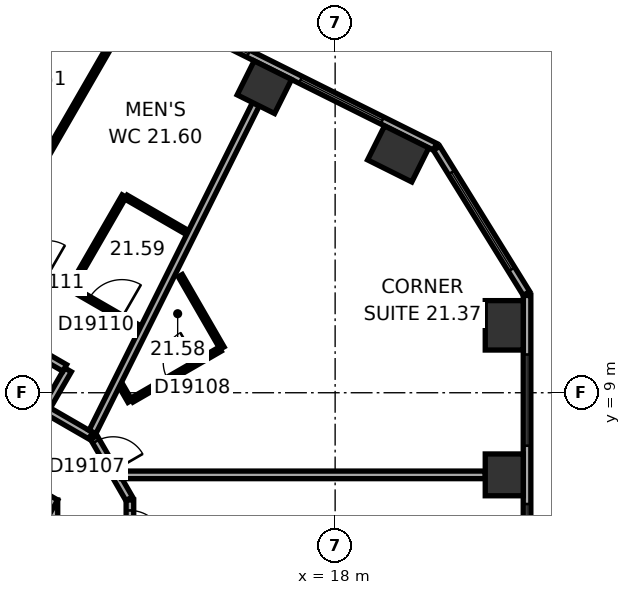
"""IFC4 building model, lengths in metres.
Left out: names, types, materials, properties, quantities, classifications, styles, units other than length and angle.
Written with IfcOpenShell. Run it as: python <this file> out.ifc"""

import sys

from ifc_helpers import new_model, si_unit, direction, frame, frame_2d, origin, origin_2d, place, context, subcontext, project, spatial, rectangle, extrude, element, fill, save


model = new_model("IFC4")
c1 = context("Model", 3, precision=1e-05, world=origin(), true_north=direction((0.0, 1.0)))
c2 = subcontext(c1, "Body", "Model", "MODEL_VIEW")
j1 = project(units=[si_unit("LENGTHUNIT", "METRE"), si_unit("PLANEANGLEUNIT", "RADIAN")], contexts=[c1])
p1 = place(None, origin())
s1 = spatial("IfcSite", under=j1, at=p1, CompositionType="ELEMENT")
p2 = place(p1, origin())
s2 = spatial("IfcBuilding", under=s1, at=p2, CompositionType="ELEMENT")
p3 = place(p2, frame((0.0, 0.0, 93.5)))
s3 = spatial("IfcBuildingStorey", under=s2, at=p3, CompositionType="ELEMENT", Elevation=93.5)
p4 = place(p3, frame((22.45, 6.839, 0.0), z_axis=(0.0, 0.0, 1.0), x_axis=(0.0, 1.0, 0.0)))
e1 = element("IfcColumn", 1, at=p4, inside=s3, PredefinedType="COLUMN", context=c2, shape_type="SweptSolid", body=[
    extrude(rectangle(XDim=1.1, YDim=1.0, at=origin_2d()), origin(), (0.0, 0.0, 1.0), 3.3),
])
for number, where, z_axis, x_axis in (
    (2, (22.45, 10.774, 0.0), (0.0, 0.0, 1.0), (0.0, 1.0, 0.0)),
    (3, (19.659, 15.284, 0.0), (0.0, 0.0, 1.0), (-0.895, 0.446, 0.0)),
):
    element("IfcColumn", number, at=place(p3, frame(where, z_axis=z_axis, x_axis=x_axis)), inside=s3, PredefinedType="COLUMN", context=c2, shape_type="SweptSolid", body=[
        extrude(rectangle(XDim=1.3, YDim=1.0, at=origin_2d()), origin(), (0.0, 0.0, 1.0), 3.3),
    ])
p5 = place(p3, frame((16.138, 17.04, 0.0), z_axis=(0.0, 0.0, 1.0), x_axis=(-0.894934361602, 0.44619781311, 0.0)))
e4 = element("IfcColumn", 4, at=p5, inside=s3, PredefinedType="COLUMN", context=c2, shape_type="SweptSolid", body=[
    extrude(rectangle(XDim=1.1, YDim=1.0, at=origin_2d()), origin(), (0.0, 0.0, 1.0), 3.3),
])
p6 = place(p3, frame((10.1, -6.177, 0.0), z_axis=(0.0, 0.0, 1.0), x_axis=(0.0, 1.0, 0.0)))
e5 = element("IfcWall", 5, at=p6, inside=s3, PredefinedType="SHEAR", context=c2, shape_type="SweptSolid", body=[
    extrude(rectangle(XDim=12.355, YDim=1.2, at=frame_2d((6.177, 0.0))), origin(), (0.0, 0.0, 1.0), 3.3),
])
p7 = place(p6, frame((6.378, 0.0, 0.0)))
e6 = element("IfcOpeningElement", 6, at=p7, cuts=e5, PredefinedType="OPENING", context=c2, shape_type="SweptSolid", body=[
    extrude(rectangle(XDim=1.5, YDim=2.1, at=frame_2d((0.75, 1.05))), frame((0.0, 0.61, 0.0), z_axis=(0.0, -1.0, 0.0), x_axis=(1.0, 0.0, 0.0)), (0.0, 0.0, 1.0), 1.22),
])
p8 = place(p6, frame((1.828, 0.0, 0.0)))
e7 = element("IfcOpeningElement", 7, at=p8, cuts=e5, PredefinedType="OPENING", context=c2, shape_type="SweptSolid", body=[
    extrude(rectangle(XDim=1.1, YDim=2.1, at=frame_2d((0.55, 1.05))), frame((0.0, 0.61, 0.0), z_axis=(0.0, -1.0, 0.0), x_axis=(1.0, 0.0, 0.0)), (0.0, 0.0, 1.0), 1.22),
])
p9 = place(p6, frame((4.427, 0.0, 0.0)))
e8 = element("IfcOpeningElement", 8, at=p9, cuts=e5, PredefinedType="OPENING", context=c2, shape_type="SweptSolid", body=[
    extrude(rectangle(XDim=1.1, YDim=2.1, at=frame_2d((0.55, 1.05))), frame((0.0, 0.61, 0.0), z_axis=(0.0, -1.0, 0.0), x_axis=(1.0, 0.0, 0.0)), (0.0, 0.0, 1.0), 1.22),
])
p10 = place(p3, frame((10.4, 5.658, 0.0), z_axis=(0.0, 0.0, 1.0), x_axis=(-0.866021384402, 0.500006961711, 0.0)))
e9 = element("IfcWall", 9, at=p10, inside=s3, PredefinedType="SHEAR", context=c2, shape_type="SweptSolid", body=[
    extrude(rectangle(XDim=12.355, YDim=1.2, at=frame_2d((6.178, 0.0))), origin(), (0.0, 0.0, 1.0), 3.3),
])
p11 = place(p10, frame((2.728, 0.0, 0.0)))
e10 = element("IfcOpeningElement", 10, at=p11, cuts=e9, PredefinedType="OPENING", context=c2, shape_type="SweptSolid", body=[
    extrude(rectangle(XDim=1.1, YDim=2.1, at=frame_2d((0.55, 1.05))), frame((0.0, 0.61, 0.0), z_axis=(0.0, -1.0, 0.0), x_axis=(1.0, 0.0, 0.0)), (0.0, 0.0, 1.0), 1.22),
])
p12 = place(p10, frame((5.328, 0.0, 0.0)))
e11 = element("IfcOpeningElement", 11, at=p12, cuts=e9, PredefinedType="OPENING", context=c2, shape_type="SweptSolid", body=[
    extrude(rectangle(XDim=1.1, YDim=2.1, at=frame_2d((0.55, 1.05))), frame((0.0, 0.61, 0.0), z_axis=(0.0, -1.0, 0.0), x_axis=(1.0, 0.0, 0.0)), (0.0, 0.0, 1.0), 1.22),
])
p13 = place(p10, frame((7.928, 0.0, 0.0)))
e12 = element("IfcOpeningElement", 12, at=p13, cuts=e9, PredefinedType="OPENING", context=c2, shape_type="SweptSolid", body=[
    extrude(rectangle(XDim=1.1, YDim=2.1, at=frame_2d((0.55, 1.05))), frame((0.0, 0.61, 0.0), z_axis=(0.0, -1.0, 0.0), x_axis=(1.0, 0.0, 0.0)), (0.0, 0.0, 1.0), 1.22),
])
p14 = place(p3, frame((23.05, -9.687, 0.0), z_axis=(0.0, 0.0, 1.0), x_axis=(0.0, 1.0, 0.0)))
e13 = element("IfcWall", 13, at=p14, inside=s3, PredefinedType="STANDARD", context=c2, shape_type="SweptSolid", body=[
    extrude(rectangle(XDim=21.246, YDim=0.2, at=frame_2d((10.623, 0.0))), origin(), (0.0, 0.0, 1.0), 3.3),
])
p15 = place(p14, frame((1.555, 0.0, 0.8)))
e14 = element("IfcOpeningElement", 14, at=p15, cuts=e13, PredefinedType="OPENING", context=c2, shape_type="SweptSolid", body=[
    extrude(rectangle(XDim=2.4, YDim=1.7, at=frame_2d((1.2, 0.85))), frame((0.0, 0.11, 0.0), z_axis=(0.0, -1.0, 0.0), x_axis=(1.0, 0.0, 0.0)), (0.0, 0.0, 1.0), 0.22),
])
p16 = place(p14, frame((5.489, 0.0, 0.8)))
e15 = element("IfcOpeningElement", 15, at=p16, cuts=e13, PredefinedType="OPENING", context=c2, shape_type="SweptSolid", body=[
    extrude(rectangle(XDim=2.4, YDim=1.7, at=frame_2d((1.2, 0.85))), frame((0.0, 0.11, 0.0), z_axis=(0.0, -1.0, 0.0), x_axis=(1.0, 0.0, 0.0)), (0.0, 0.0, 1.0), 0.22),
])
p17 = place(p14, frame((9.424, 0.0, 0.8)))
e16 = element("IfcOpeningElement", 16, at=p17, cuts=e13, PredefinedType="OPENING", context=c2, shape_type="SweptSolid", body=[
    extrude(rectangle(XDim=2.4, YDim=1.7, at=frame_2d((1.2, 0.85))), frame((0.0, 0.11, 0.0), z_axis=(0.0, -1.0, 0.0), x_axis=(1.0, 0.0, 0.0)), (0.0, 0.0, 1.0), 0.22),
])
p18 = place(p14, frame((13.358, 0.0, 0.8)))
e17 = element("IfcOpeningElement", 17, at=p18, cuts=e13, PredefinedType="OPENING", context=c2, shape_type="SweptSolid", body=[
    extrude(rectangle(XDim=2.4, YDim=1.7, at=frame_2d((1.2, 0.85))), frame((0.0, 0.11, 0.0), z_axis=(0.0, -1.0, 0.0), x_axis=(1.0, 0.0, 0.0)), (0.0, 0.0, 1.0), 0.22),
])
p19 = place(p14, frame((17.293, 0.0, 0.8)))
e18 = element("IfcOpeningElement", 18, at=p19, cuts=e13, PredefinedType="OPENING", context=c2, shape_type="SweptSolid", body=[
    extrude(rectangle(XDim=2.4, YDim=1.7, at=frame_2d((1.2, 0.85))), frame((0.0, 0.11, 0.0), z_axis=(0.0, -1.0, 0.0), x_axis=(1.0, 0.0, 0.0)), (0.0, 0.0, 1.0), 0.22),
])
p20 = place(p3, frame((23.035, 11.612, 0.0), z_axis=(0.0, 0.0, 1.0), x_axis=(-0.526160091227, 0.850385535155, 0.0)))
e19 = element("IfcWall", 19, at=p20, inside=s3, PredefinedType="STANDARD", context=c2, shape_type="SweptSolid", body=[
    extrude(rectangle(XDim=4.494, YDim=0.2, at=frame_2d((2.247, 0.0))), origin(), (0.0, 0.0, 1.0), 3.3),
])
p21 = place(p20, frame((0.747, 0.0, 0.8)))
e20 = element("IfcOpeningElement", 20, at=p21, cuts=e19, PredefinedType="OPENING", context=c2, shape_type="SweptSolid", body=[
    extrude(rectangle(XDim=3.0, YDim=1.7, at=frame_2d((1.5, 0.85))), frame((0.0, 0.11, 0.0), z_axis=(0.0, -1.0, 0.0), x_axis=(1.0, 0.0, 0.0)), (0.0, 0.0, 1.0), 0.22),
])
p22 = place(p3, frame((20.63, 15.47, 0.0), z_axis=(0.0, 0.0, 1.0), x_axis=(-0.894934518609, 0.446197498203, 0.0)))
e21 = element("IfcWall", 21, at=p22, inside=s3, PredefinedType="STANDARD", context=c2, shape_type="SweptSolid", body=[
    extrude(rectangle(XDim=21.246, YDim=0.2, at=frame_2d((10.623, 0.0))), origin(), (0.0, 0.0, 1.0), 3.3),
])
p23 = place(p22, frame((1.553, 0.0, 0.8)))
e22 = element("IfcOpeningElement", 22, at=p23, cuts=e21, PredefinedType="OPENING", context=c2, shape_type="SweptSolid", body=[
    extrude(rectangle(XDim=2.4, YDim=1.7, at=frame_2d((1.2, 0.85))), frame((0.0, 0.11, 0.0), z_axis=(0.0, -1.0, 0.0), x_axis=(1.0, 0.0, 0.0)), (0.0, 0.0, 1.0), 0.22),
])
p24 = place(p22, frame((5.488, 0.0, 0.8)))
e23 = element("IfcOpeningElement", 23, at=p24, cuts=e21, PredefinedType="OPENING", context=c2, shape_type="SweptSolid", body=[
    extrude(rectangle(XDim=2.4, YDim=1.7, at=frame_2d((1.2, 0.85))), frame((0.0, 0.11, 0.0), z_axis=(0.0, -1.0, 0.0), x_axis=(1.0, 0.0, 0.0)), (0.0, 0.0, 1.0), 0.22),
])
p25 = place(p22, frame((9.422, 0.0, 0.8)))
e24 = element("IfcOpeningElement", 24, at=p25, cuts=e21, PredefinedType="OPENING", context=c2, shape_type="SweptSolid", body=[
    extrude(rectangle(XDim=2.4, YDim=1.7, at=frame_2d((1.2, 0.85))), frame((0.0, 0.11, 0.0), z_axis=(0.0, -1.0, 0.0), x_axis=(1.0, 0.0, 0.0)), (0.0, 0.0, 1.0), 0.22),
])
p26 = place(p22, frame((13.357, 0.0, 0.8)))
e25 = element("IfcOpeningElement", 25, at=p26, cuts=e21, PredefinedType="OPENING", context=c2, shape_type="SweptSolid", body=[
    extrude(rectangle(XDim=2.4, YDim=1.7, at=frame_2d((1.2, 0.85))), frame((0.0, 0.11, 0.0), z_axis=(0.0, -1.0, 0.0), x_axis=(1.0, 0.0, 0.0)), (0.0, 0.0, 1.0), 0.22),
])
p27 = place(p22, frame((17.292, 0.0, 0.8)))
e26 = element("IfcOpeningElement", 26, at=p27, cuts=e21, PredefinedType="OPENING", context=c2, shape_type="SweptSolid", body=[
    extrude(rectangle(XDim=2.4, YDim=1.7, at=frame_2d((1.2, 0.85))), frame((0.0, 0.11, 0.0), z_axis=(0.0, -1.0, 0.0), x_axis=(1.0, 0.0, 0.0)), (0.0, 0.0, 1.0), 0.22),
])
p28 = place(p3, frame((10.371, 8.561, 0.0), z_axis=(0.0, 0.0, 1.0), x_axis=(0.499986357472, 0.866033280158, 0.0)))
e27 = element("IfcWall", 27, at=p28, inside=s3, PredefinedType="PARTITIONING", context=c2, shape_type="SweptSolid", body=[
    extrude(rectangle(XDim=1.201, YDim=0.2, at=frame_2d((0.601, 0.0))), origin(), (0.0, 0.0, 1.0), 3.05),
])
p29 = place(p3, frame((10.885, 9.652, 0.0), z_axis=(0.0, 0.0, 1.0), x_axis=(-0.866033868542, 0.499985338323, 0.0)))
e28 = element("IfcWall", 28, at=p29, inside=s3, PredefinedType="PARTITIONING", context=c2, shape_type="SweptSolid", body=[
    extrude(rectangle(XDim=8.602, YDim=0.2, at=frame_2d((4.301, 0.0))), origin(), (0.0, 0.0, 1.0), 3.05),
])
p30 = place(p29, frame((2.739, 0.0, 0.0)))
e29 = element("IfcOpeningElement", 29, at=p30, cuts=e28, PredefinedType="OPENING", context=c2, shape_type="SweptSolid", body=[
    extrude(rectangle(XDim=1.0, YDim=2.1, at=frame_2d((0.5, 1.05))), frame((0.0, 0.11, 0.0), z_axis=(0.0, -1.0, 0.0), x_axis=(1.0, 0.0, 0.0)), (0.0, 0.0, 1.0), 0.22),
])
p31 = place(p3, frame((11.566, 7.871, 0.0), z_axis=(0.0, 0.0, 1.0), x_axis=(-0.866004557827, 0.500036104519, 0.0)))
e30 = element("IfcWall", 30, at=p31, inside=s3, PredefinedType="PARTITIONING", context=c2, shape_type="SweptSolid", body=[
    extrude(rectangle(XDim=1.28, YDim=0.2, at=frame_2d((0.64, 0.0))), origin(), (0.0, 0.0, 1.0), 3.05),
])
p32 = place(p3, frame((12.243, 18.423, 0.0), z_axis=(0.0, 0.0, 1.0), x_axis=(-0.499993523031, -0.866029143232, 0.0)))
e31 = element("IfcWall", 31, at=p32, inside=s3, PredefinedType="PARTITIONING", context=c2, shape_type="SweptSolid", body=[
    extrude(rectangle(XDim=6.315, YDim=0.12, at=frame_2d((3.157, 0.0))), origin(), (0.0, 0.0, 1.0), 2.6),
])
p33 = place(p3, frame((12.448, 14.177, 0.0), z_axis=(0.0, 0.0, 1.0), x_axis=(-0.500048966069, -0.865997131366, 0.0)))
e32 = element("IfcWall", 32, at=p33, inside=s3, PredefinedType="PARTITIONING", context=c2, shape_type="SweptSolid", body=[
    extrude(rectangle(XDim=2.74, YDim=0.12, at=frame_2d((1.37, 0.0))), origin(), (0.0, 0.0, 1.0), 3.05),
])
p34 = place(p3, frame((12.58, 6.212, 0.0), z_axis=(0.0, 0.0, 1.0), x_axis=(-0.500063286585, 0.865988862174, 0.0)))
e33 = element("IfcWall", 33, at=p34, inside=s3, PredefinedType="PARTITIONING", context=c2, shape_type="SweptSolid", body=[
    extrude(rectangle(XDim=1.86, YDim=0.2, at=frame_2d((0.93, 0.0))), origin(), (0.0, 0.0, 1.0), 3.05),
])
p35 = place(p34, frame((0.842, 0.0, 0.0)))
e34 = element("IfcOpeningElement", 34, at=p35, cuts=e33, PredefinedType="OPENING", context=c2, shape_type="SweptSolid", body=[
    extrude(rectangle(XDim=0.9, YDim=2.1, at=frame_2d((0.45, 1.05))), frame((0.0, 0.11, 0.0), z_axis=(0.0, -1.0, 0.0), x_axis=(1.0, 0.0, 0.0)), (0.0, 0.0, 1.0), 0.22),
])
p36 = place(p3, frame((12.6, 3.004, 0.0), z_axis=(0.0, 0.0, 1.0), x_axis=(0.0, 1.0, 0.0)))
e35 = element("IfcWall", 35, at=p36, inside=s3, PredefinedType="PARTITIONING", context=c2, shape_type="SweptSolid", body=[
    extrude(rectangle(XDim=3.173, YDim=0.2, at=frame_2d((1.586, 0.0))), origin(), (0.0, 0.0, 1.0), 3.05),
])
p37 = place(p36, frame((1.998, 0.0, 0.0)))
e36 = element("IfcOpeningElement", 36, at=p37, cuts=e35, PredefinedType="OPENING", context=c2, shape_type="SweptSolid", body=[
    extrude(rectangle(XDim=0.9, YDim=2.1, at=frame_2d((0.45, 1.05))), frame((0.0, 0.11, 0.0), z_axis=(0.0, -1.0, 0.0), x_axis=(1.0, 0.0, 0.0)), (0.0, 0.0, 1.0), 0.22),
])
p38 = place(p3, frame((12.601, 8.776, 0.0), z_axis=(0.0, 0.0, 1.0), x_axis=(-0.500166486798, 0.865929261247, 0.0)))
e37 = element("IfcWall", 37, at=p38, inside=s3, PredefinedType="PARTITIONING", context=c2, shape_type="SweptSolid", body=[
    extrude(rectangle(XDim=0.476, YDim=0.12, at=frame_2d((0.238, 0.0))), origin(), (0.0, 0.0, 1.0), 3.05),
])
p39 = place(p3, frame((12.866, 10.702, 0.0), z_axis=(0.0, 0.0, 1.0), x_axis=(-0.866023151433, 0.500003901167, 0.0)))
e38 = element("IfcWall", 38, at=p39, inside=s3, PredefinedType="PARTITIONING", context=c2, shape_type="SweptSolid", body=[
    extrude(rectangle(XDim=7.684, YDim=0.12, at=frame_2d((3.842, 0.0))), origin(), (0.0, 0.0, 1.0), 3.05),
])
p40 = place(p39, frame((0.55, 0.0, 0.0)))
e39 = element("IfcOpeningElement", 39, at=p40, cuts=e38, PredefinedType="OPENING", context=c2, shape_type="SweptSolid", body=[
    extrude(rectangle(XDim=1.0, YDim=2.1, at=frame_2d((0.5, 1.05))), frame((0.0, 0.07, 0.0), z_axis=(0.0, -1.0, 0.0), x_axis=(1.0, 0.0, 0.0)), (0.0, 0.0, 1.0), 0.14),
])
p41 = place(p39, frame((2.8, 0.0, 0.0)))
e40 = element("IfcOpeningElement", 40, at=p41, cuts=e38, PredefinedType="OPENING", context=c2, shape_type="SweptSolid", body=[
    extrude(rectangle(XDim=0.9, YDim=2.1, at=frame_2d((0.45, 1.05))), frame((0.0, 0.07, 0.0), z_axis=(0.0, -1.0, 0.0), x_axis=(1.0, 0.0, 0.0)), (0.0, 0.0, 1.0), 0.14),
])
p42 = place(p39, frame((5.592, 0.0, 0.0)))
e41 = element("IfcOpeningElement", 41, at=p42, cuts=e38, PredefinedType="OPENING", context=c2, shape_type="SweptSolid", body=[
    extrude(rectangle(XDim=0.9, YDim=2.1, at=frame_2d((0.45, 1.05))), frame((0.0, 0.07, 0.0), z_axis=(0.0, -1.0, 0.0), x_axis=(1.0, 0.0, 0.0)), (0.0, 0.0, 1.0), 0.14),
])
p43 = place(p3, frame((13.926, 12.081, 0.0), z_axis=(0.0, 0.0, 1.0), x_axis=(0.499994660107, -0.866028486751, 0.0)))
e42 = element("IfcWall", 42, at=p43, inside=s3, PredefinedType="PARTITIONING", context=c2, shape_type="SweptSolid", body=[
    extrude(rectangle(XDim=2.2, YDim=0.12, at=frame_2d((1.1, 0.0))), origin(), (0.0, 0.0, 1.0), 3.05),
])
p44 = place(p3, frame((14.118, 13.212, 0.0), z_axis=(0.0, 0.0, 1.0), x_axis=(-0.866039825209, 0.499975020527, 0.0)))
e43 = element("IfcWall", 43, at=p44, inside=s3, PredefinedType="PARTITIONING", context=c2, shape_type="SweptSolid", body=[
    extrude(rectangle(XDim=1.869, YDim=0.12, at=frame_2d((0.934, 0.0))), origin(), (0.0, 0.0, 1.0), 3.05),
])
p45 = place(p3, frame((14.974, 10.146, 0.0), z_axis=(0.0, 0.0, 1.0), x_axis=(-0.86599746015, -0.500048396672, 0.0)))
e44 = element("IfcWall", 44, at=p45, inside=s3, PredefinedType="PARTITIONING", context=c2, shape_type="SweptSolid", body=[
    extrude(rectangle(XDim=2.68, YDim=0.12, at=frame_2d((1.34, 0.0))), origin(), (0.0, 0.0, 1.0), 3.05),
])
p46 = place(p45, frame((0.69, 0.0, 0.0)))
e45 = element("IfcOpeningElement", 45, at=p46, cuts=e44, PredefinedType="OPENING", context=c2, shape_type="SweptSolid", body=[
    extrude(rectangle(XDim=0.9, YDim=2.1, at=frame_2d((0.45, 1.05))), frame((0.0, 0.07, 0.0), z_axis=(0.0, -1.0, 0.0), x_axis=(1.0, 0.0, 0.0)), (0.0, 0.0, 1.0), 0.14),
])
p47 = place(p3, frame((15.915, 16.592, 0.0), z_axis=(0.0, 0.0, 1.0), x_axis=(-0.446199736347, -0.894933402709, 0.0)))
e46 = element("IfcWall", 46, at=p47, inside=s3, PredefinedType="PARTITIONING", context=c2, shape_type="SweptSolid", body=[
    extrude(rectangle(XDim=9.635, YDim=0.2, at=frame_2d((4.817, 0.0))), origin(), (0.0, 0.0, 1.0), 3.05),
])
p48 = place(p3, frame((21.95, 6.839, 0.0), z_axis=(0.0, 0.0, 1.0), x_axis=(-1.0, 0.0, 0.0)))
e47 = element("IfcWall", 47, at=p48, inside=s3, PredefinedType="PARTITIONING", context=c2, shape_type="SweptSolid", body=[
    extrude(rectangle(XDim=9.572, YDim=0.2, at=frame_2d((4.786, 0.0))), origin(), (0.0, 0.0, 1.0), 3.05),
])
p49 = place(p18, origin())
e48 = element("IfcWindow", 48, at=p49, inside=s3, PartitioningType="SINGLE_PANEL", PredefinedType="WINDOW", context=c2, shape_type="SweptSolid", body=[
    extrude(rectangle(XDim=2.4, YDim=1.7, at=frame_2d((1.2, 0.85))), frame((0.0, 0.03, 0.0), z_axis=(0.0, -1.0, 0.0), x_axis=(1.0, 0.0, 0.0)), (0.0, 0.0, 1.0), 0.06),
])
fill(e17, e48)
p50 = place(p19, origin())
e49 = element("IfcWindow", 49, at=p50, inside=s3, PartitioningType="SINGLE_PANEL", PredefinedType="WINDOW", context=c2, shape_type="SweptSolid", body=[
    extrude(rectangle(XDim=2.4, YDim=1.7, at=frame_2d((1.2, 0.85))), frame((0.0, 0.03, 0.0), z_axis=(0.0, -1.0, 0.0), x_axis=(1.0, 0.0, 0.0)), (0.0, 0.0, 1.0), 0.06),
])
fill(e18, e49)
p51 = place(p21, origin())
e50 = element("IfcWindow", 50, at=p51, inside=s3, PartitioningType="SINGLE_PANEL", PredefinedType="WINDOW", context=c2, shape_type="SweptSolid", body=[
    extrude(rectangle(XDim=3.0, YDim=1.7, at=frame_2d((1.5, 0.85))), frame((0.0, 0.03, 0.0), z_axis=(0.0, -1.0, 0.0), x_axis=(1.0, 0.0, 0.0)), (0.0, 0.0, 1.0), 0.06),
])
fill(e20, e50)
p52 = place(p23, origin())
e51 = element("IfcWindow", 51, at=p52, inside=s3, PartitioningType="SINGLE_PANEL", PredefinedType="WINDOW", context=c2, shape_type="SweptSolid", body=[
    extrude(rectangle(XDim=2.4, YDim=1.7, at=frame_2d((1.2, 0.85))), frame((0.0, 0.03, 0.0), z_axis=(0.0, -1.0, 0.0), x_axis=(1.0, 0.0, 0.0)), (0.0, 0.0, 1.0), 0.06),
])
fill(e22, e51)
p53 = place(p24, origin())
e52 = element("IfcWindow", 52, at=p53, inside=s3, PartitioningType="SINGLE_PANEL", PredefinedType="WINDOW", context=c2, shape_type="SweptSolid", body=[
    extrude(rectangle(XDim=2.4, YDim=1.7, at=frame_2d((1.2, 0.85))), frame((0.0, 0.03, 0.0), z_axis=(0.0, -1.0, 0.0), x_axis=(1.0, 0.0, 0.0)), (0.0, 0.0, 1.0), 0.06),
])
fill(e23, e52)
p54 = place(p37, origin())
e53 = element("IfcDoor", 53, at=p54, inside=s3, OperationType="SINGLE_SWING_LEFT", PredefinedType="DOOR", context=c2, shape_type="SweptSolid", body=[
    extrude(rectangle(XDim=0.9, YDim=2.1, at=frame_2d((0.45, 1.05))), frame((0.0, 0.025, 0.0), z_axis=(0.0, -1.0, 0.0), x_axis=(1.0, 0.0, 0.0)), (0.0, 0.0, 1.0), 0.05),
])
fill(e36, e53)
p55 = place(p35, origin())
e54 = element("IfcDoor", 54, at=p55, inside=s3, OperationType="SINGLE_SWING_LEFT", PredefinedType="DOOR", context=c2, shape_type="SweptSolid", body=[
    extrude(rectangle(XDim=0.9, YDim=2.1, at=frame_2d((0.45, 1.05))), frame((0.0, 0.025, 0.0), z_axis=(0.0, -1.0, 0.0), x_axis=(1.0, 0.0, 0.0)), (0.0, 0.0, 1.0), 0.05),
])
fill(e34, e54)
p56 = place(p46, origin())
e55 = element("IfcDoor", 55, at=p56, inside=s3, OperationType="SINGLE_SWING_LEFT", PredefinedType="DOOR", context=c2, shape_type="SweptSolid", body=[
    extrude(rectangle(XDim=0.9, YDim=2.1, at=frame_2d((0.45, 1.05))), frame((0.0, 0.025, 0.0), z_axis=(0.0, -1.0, 0.0), x_axis=(1.0, 0.0, 0.0)), (0.0, 0.0, 1.0), 0.05),
])
fill(e45, e55)
p57 = place(p40, origin())
e56 = element("IfcDoor", 56, at=p57, inside=s3, OperationType="SINGLE_SWING_LEFT", PredefinedType="DOOR", context=c2, shape_type="SweptSolid", body=[
    extrude(rectangle(XDim=1.0, YDim=2.1, at=frame_2d((0.5, 1.05))), frame((0.0, 0.025, 0.0), z_axis=(0.0, -1.0, 0.0), x_axis=(1.0, 0.0, 0.0)), (0.0, 0.0, 1.0), 0.05),
])
fill(e39, e56)
save(model, sys.argv[1])
